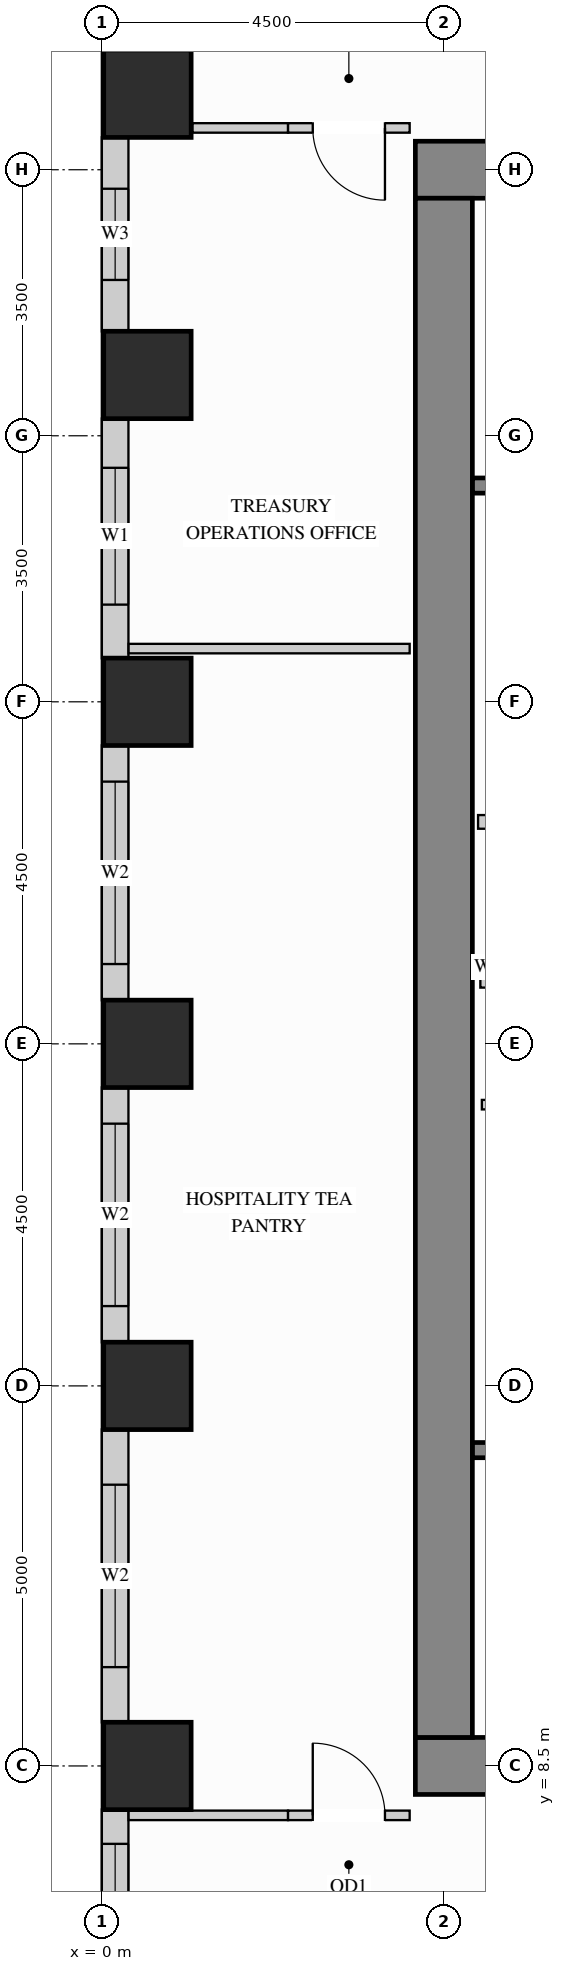
"""IFC4 building model, lengths in metres.
Left out: names, types, materials, properties, quantities, classifications, styles, units other than length and angle.
Written with IfcOpenShell. Run it as: python <this file> out.ifc"""

import sys

from ifc_helpers import new_model, si_unit, direction, frame, frame_2d, origin, origin_2d, place, context, subcontext, project, spatial, rectangle, extrude, source, transform, mapped, element, fill, save


model = new_model("IFC4")
c1 = context("Model", 3, precision=1e-05, world=origin(), true_north=direction((0.0, 1.0)))
c2 = subcontext(c1, "Body", "Model", "MODEL_VIEW")
j1 = project(units=[si_unit("LENGTHUNIT", "METRE"), si_unit("PLANEANGLEUNIT", "RADIAN")], contexts=[c1])
p1 = place(None, origin())
s1 = spatial("IfcSite", under=j1, at=p1, CompositionType="ELEMENT")
p2 = place(p1, origin())
s2 = spatial("IfcBuilding", under=s1, at=p2, CompositionType="ELEMENT")
p3 = place(p2, frame((0.0, 0.0, 99.0)))
s3 = spatial("IfcBuildingStorey", under=s2, at=p3, CompositionType="ELEMENT", Elevation=99.0)
m1 = source(origin(), c2, "Body", "SweptSolid", [
    extrude(rectangle(XDim=1.15, YDim=1.15, at=origin_2d()), origin(), (0.0, 0.0, 1.0), 3.38),
])
for number, where, z_axis, x_axis in (
    (1, (0.6, 13.5, 0.0), (0.0, 0.0, 1.0), (1.0, 0.0, 0.0)),
    (2, (0.6, 18.0, 0.0), (0.0, 0.0, 1.0), (1.0, 0.0, 0.0)),
    (3, (0.6, 22.5, 0.0), (0.0, 0.0, 1.0), (1.0, 0.0, 0.0)),
    (4, (0.6, 26.8, 0.0), (0.0, 0.0, 1.0), (1.0, 0.0, 0.0)),
    (5, (0.6, 30.5, 0.0), (0.0, 0.0, 1.0), (1.0, 0.0, 0.0)),
    (6, (0.6, 8.5, 0.0), (0.0, 0.0, 1.0), (1.0, 0.0, 0.0)),
):
    element("IfcColumn", number, at=place(p3, frame(where, z_axis=z_axis, x_axis=x_axis)), inside=s3, PredefinedType="COLUMN", context=c2, shape_type="MappedRepresentation", body=[
        mapped(m1, transform((0.0, 0.0, 0.0), x_axis=(1.0, 0.0, 0.0), y_axis=(0.0, 1.0, 0.0), z_axis=(0.0, 0.0, 1.0))),
    ])
m2 = source(origin(), c2, "Body", "SweptSolid", [
    extrude(rectangle(XDim=10.75, YDim=0.75, at=frame_2d((5.375, 0.0))), origin(), (0.0, 0.0, 1.0), 3.38),
])
for number, where, z_axis, x_axis in (
    (7, (4.125, 29.5, 0.0), (0.0, 0.0, 1.0), (1.0, 0.0, 0.0)),
    (8, (4.125, 8.5, 0.0), (0.0, 0.0, 1.0), (1.0, 0.0, 0.0)),
):
    element("IfcWall", number, at=place(p3, frame(where, z_axis=z_axis, x_axis=x_axis)), inside=s3, PredefinedType="SHEAR", context=c2, shape_type="MappedRepresentation", body=[
        mapped(m2, transform((0.0, 0.0, 0.0), x_axis=(1.0, 0.0, 0.0), y_axis=(0.0, 1.0, 0.0), z_axis=(0.0, 0.0, 1.0))),
    ])
m3 = source(origin(), c2, "Body", "SweptSolid", [
    extrude(rectangle(XDim=20.25, YDim=0.75, at=frame_2d((10.125, 0.0))), origin(), (0.0, 0.0, 1.0), 3.38),
])
p4 = place(p3, frame((4.5, 8.875, 0.0), z_axis=(0.0, 0.0, 1.0), x_axis=(0.0, 1.0, 0.0)))
e9 = element("IfcWall", 9, at=p4, inside=s3, PredefinedType="SHEAR", context=c2, shape_type="MappedRepresentation", body=[
    mapped(m3, transform((0.0, 0.0, 0.0), x_axis=(1.0, 0.0, 0.0), y_axis=(0.0, 1.0, 0.0), z_axis=(0.0, 0.0, 1.0))),
])
p5 = place(p3, frame((0.175, 29.927, 0.0), z_axis=(0.0, 0.0, 1.0), x_axis=(0.0, -1.0, 0.0)))
e10 = element("IfcWall", 10, at=p5, inside=s3, PredefinedType="SOLIDWALL", context=c2, shape_type="SweptSolid", body=[
    extrude(rectangle(XDim=2.554, YDim=0.35, at=frame_2d((1.277, 0.0))), origin(), (0.0, 0.0, 1.0), 3.365),
])
p6 = place(p5, frame((0.677, 0.0, 0.78)))
e11 = element("IfcOpeningElement", 11, at=p6, cuts=e10, PredefinedType="OPENING", context=c2, shape_type="SweptSolid", body=[
    extrude(rectangle(XDim=1.2, YDim=2.1, at=frame_2d((0.6, 1.05))), frame((0.0, 0.185, 0.0), z_axis=(0.0, -1.0, 0.0), x_axis=(1.0, 0.0, 0.0)), (0.0, 0.0, 1.0), 0.37),
])
p7 = place(p3, frame((0.175, 26.227, 0.0), z_axis=(0.0, 0.0, 1.0), x_axis=(0.0, -1.0, 0.0)))
e12 = element("IfcWall", 12, at=p7, inside=s3, PredefinedType="SOLIDWALL", context=c2, shape_type="SweptSolid", body=[
    extrude(rectangle(XDim=3.154, YDim=0.35, at=frame_2d((1.577, 0.0))), origin(), (0.0, 0.0, 1.0), 3.365),
])
p8 = place(p7, frame((0.648, 0.0, 0.78)))
e13 = element("IfcOpeningElement", 13, at=p8, cuts=e12, PredefinedType="OPENING", context=c2, shape_type="SweptSolid", body=[
    extrude(rectangle(XDim=1.8, YDim=2.1, at=frame_2d((0.9, 1.05))), frame((0.0, 0.185, 0.0), z_axis=(0.0, -1.0, 0.0), x_axis=(1.0, 0.0, 0.0)), (0.0, 0.0, 1.0), 0.37),
])
p9 = place(p3, frame((0.175, 21.927, 0.0), z_axis=(0.0, 0.0, 1.0), x_axis=(0.0, -1.0, 0.0)))
e14 = element("IfcWall", 14, at=p9, inside=s3, PredefinedType="SOLIDWALL", context=c2, shape_type="SweptSolid", body=[
    extrude(rectangle(XDim=3.354, YDim=0.35, at=frame_2d((1.677, 0.0))), origin(), (0.0, 0.0, 1.0), 3.365),
])
p10 = place(p9, frame((0.477, 0.0, 0.78)))
e15 = element("IfcOpeningElement", 15, at=p10, cuts=e14, PredefinedType="OPENING", context=c2, shape_type="SweptSolid", body=[
    extrude(rectangle(XDim=2.4, YDim=2.1, at=frame_2d((1.2, 1.05))), frame((0.0, 0.185, 0.0), z_axis=(0.0, -1.0, 0.0), x_axis=(1.0, 0.0, 0.0)), (0.0, 0.0, 1.0), 0.37),
])
p11 = place(p3, frame((0.175, 17.427, 0.0), z_axis=(0.0, 0.0, 1.0), x_axis=(0.0, -1.0, 0.0)))
e16 = element("IfcWall", 16, at=p11, inside=s3, PredefinedType="SOLIDWALL", context=c2, shape_type="SweptSolid", body=[
    extrude(rectangle(XDim=3.354, YDim=0.35, at=frame_2d((1.677, 0.0))), origin(), (0.0, 0.0, 1.0), 3.365),
])
p12 = place(p11, frame((0.477, 0.0, 0.78)))
e17 = element("IfcOpeningElement", 17, at=p12, cuts=e16, PredefinedType="OPENING", context=c2, shape_type="SweptSolid", body=[
    extrude(rectangle(XDim=2.4, YDim=2.1, at=frame_2d((1.2, 1.05))), frame((0.0, 0.185, 0.0), z_axis=(0.0, -1.0, 0.0), x_axis=(1.0, 0.0, 0.0)), (0.0, 0.0, 1.0), 0.37),
])
p13 = place(p3, frame((0.175, 12.927, 0.0), z_axis=(0.0, 0.0, 1.0), x_axis=(0.0, -1.0, 0.0)))
e18 = element("IfcWall", 18, at=p13, inside=s3, PredefinedType="SOLIDWALL", context=c2, shape_type="SweptSolid", body=[
    extrude(rectangle(XDim=3.854, YDim=0.35, at=frame_2d((1.927, 0.0))), origin(), (0.0, 0.0, 1.0), 3.365),
])
p14 = place(p13, frame((0.727, 0.0, 0.78)))
e19 = element("IfcOpeningElement", 19, at=p14, cuts=e18, PredefinedType="OPENING", context=c2, shape_type="SweptSolid", body=[
    extrude(rectangle(XDim=2.4, YDim=2.1, at=frame_2d((1.2, 1.05))), frame((0.0, 0.185, 0.0), z_axis=(0.0, -1.0, 0.0), x_axis=(1.0, 0.0, 0.0)), (0.0, 0.0, 1.0), 0.37),
])
p15 = place(p3, frame((0.175, 7.927, 0.0), z_axis=(0.0, 0.0, 1.0), x_axis=(0.0, -1.0, 0.0)))
e20 = element("IfcWall", 20, at=p15, inside=s3, PredefinedType="SOLIDWALL", context=c2, shape_type="SweptSolid", body=[
    extrude(rectangle(XDim=3.854, YDim=0.35, at=frame_2d((1.927, 0.0))), origin(), (0.0, 0.0, 1.0), 3.365),
])
p16 = place(p15, frame((0.452, 0.0, 0.78)))
e21 = element("IfcOpeningElement", 21, at=p16, cuts=e20, PredefinedType="OPENING", context=c2, shape_type="SweptSolid", body=[
    extrude(rectangle(XDim=2.4, YDim=2.1, at=frame_2d((1.2, 1.05))), frame((0.0, 0.185, 0.0), z_axis=(0.0, -1.0, 0.0), x_axis=(1.0, 0.0, 0.0)), (0.0, 0.0, 1.0), 0.37),
])
m4 = source(origin(), c2, "Body", "SweptSolid", [
    extrude(rectangle(XDim=2.2, YDim=0.18, at=frame_2d((1.1, 0.0))), origin(), (0.0, 0.0, 1.0), 3.365),
])
p17 = place(p3, frame((4.95, 20.92, 0.0), z_axis=(0.0, 0.0, 1.0), x_axis=(1.0, 0.0, 0.0)))
e22 = element("IfcWall", 22, at=p17, inside=s3, PredefinedType="PARTITIONING", context=c2, shape_type="MappedRepresentation", body=[
    mapped(m4, transform((0.0, 0.0, 0.0), x_axis=(1.0, 0.0, 0.0), y_axis=(0.0, 1.0, 0.0), z_axis=(0.0, 0.0, 1.0))),
])
p18 = place(p3, frame((5.0, 17.2, 0.0), z_axis=(0.0, 0.0, 1.0), x_axis=(1.0, 0.0, 0.0)))
e23 = element("IfcWall", 23, at=p18, inside=s3, PredefinedType="PARTITIONING", context=c2, shape_type="SweptSolid", body=[
    extrude(rectangle(XDim=2.4, YDim=0.125, at=frame_2d((1.2, 0.0))), origin(), (0.0, 0.0, 1.0), 3.365),
])
p19 = place(p18, frame((0.7, 0.0, 0.0)))
e24 = element("IfcOpeningElement", 24, at=p19, cuts=e23, PredefinedType="OPENING", context=c2, shape_type="SweptSolid", body=[
    extrude(rectangle(XDim=0.85, YDim=2.1, at=frame_2d((0.425, 1.05))), frame((0.0, 0.073, 0.0), z_axis=(0.0, -1.0, 0.0), x_axis=(1.0, 0.0, 0.0)), (0.0, 0.0, 1.0), 0.145),
])
m5 = source(origin(), c2, "Body", "SweptSolid", [
    extrude(rectangle(XDim=1.26, YDim=0.125, at=frame_2d((0.63, 0.0))), origin(), (0.0, 0.0, 1.0), 3.365),
])
p20 = place(p3, frame((1.19, 30.05, 0.0), z_axis=(0.0, 0.0, 1.0), x_axis=(1.0, 0.0, 0.0)))
e25 = element("IfcWall", 25, at=p20, inside=s3, PredefinedType="PARTITIONING", context=c2, shape_type="MappedRepresentation", body=[
    mapped(m5, transform((0.0, 0.0, 0.0), x_axis=(1.0, 0.0, 0.0), y_axis=(0.0, 1.0, 0.0), z_axis=(0.0, 0.0, 1.0))),
])
p21 = place(p3, frame((2.45, 30.05, 0.0), z_axis=(0.0, 0.0, 1.0), x_axis=(1.0, 0.0, 0.0)))
e26 = element("IfcWall", 26, at=p21, inside=s3, PredefinedType="PARTITIONING", context=c2, shape_type="SweptSolid", body=[
    extrude(rectangle(XDim=1.6, YDim=0.125, at=frame_2d((0.8, 0.0))), origin(), (0.0, 0.0, 1.0), 3.365),
])
p22 = place(p21, frame((0.325, 0.0, 0.0)))
e27 = element("IfcOpeningElement", 27, at=p22, cuts=e26, PredefinedType="OPENING", context=c2, shape_type="SweptSolid", body=[
    extrude(rectangle(XDim=0.95, YDim=2.15, at=frame_2d((0.475, 1.075))), frame((0.0, 0.073, 0.0), z_axis=(0.0, -1.0, 0.0), x_axis=(1.0, 0.0, 0.0)), (0.0, 0.0, 1.0), 0.145),
])
m6 = source(origin(), c2, "Body", "SweptSolid", [
    extrude(rectangle(XDim=2.098, YDim=0.125, at=frame_2d((1.049, 0.0))), origin(), (0.0, 0.0, 1.0), 3.365),
])
p23 = place(p3, frame((0.352, 7.85, 0.0), z_axis=(0.0, 0.0, 1.0), x_axis=(1.0, 0.0, 0.0)))
e28 = element("IfcWall", 28, at=p23, inside=s3, PredefinedType="PARTITIONING", context=c2, shape_type="MappedRepresentation", body=[
    mapped(m6, transform((0.0, 0.0, 0.0), x_axis=(1.0, 0.0, 0.0), y_axis=(0.0, 1.0, 0.0), z_axis=(0.0, 0.0, 1.0))),
])
p24 = place(p3, frame((2.45, 7.85, 0.0), z_axis=(0.0, 0.0, 1.0), x_axis=(1.0, 0.0, 0.0)))
e29 = element("IfcWall", 29, at=p24, inside=s3, PredefinedType="PARTITIONING", context=c2, shape_type="SweptSolid", body=[
    extrude(rectangle(XDim=1.6, YDim=0.125, at=frame_2d((0.8, 0.0))), origin(), (0.0, 0.0, 1.0), 3.365),
])
p25 = place(p24, frame((0.325, 0.0, 0.0)))
e30 = element("IfcOpeningElement", 30, at=p25, cuts=e29, PredefinedType="OPENING", context=c2, shape_type="SweptSolid", body=[
    extrude(rectangle(XDim=0.95, YDim=2.15, at=frame_2d((0.475, 1.075))), frame((0.0, 0.073, 0.0), z_axis=(0.0, -1.0, 0.0), x_axis=(1.0, 0.0, 0.0)), (0.0, 0.0, 1.0), 0.145),
])
m7 = source(origin(), c2, "Body", "SweptSolid", [
    extrude(rectangle(XDim=3.698, YDim=0.125, at=frame_2d((1.849, 0.0))), origin(), (0.0, 0.0, 1.0), 3.365),
])
p26 = place(p3, frame((0.352, 23.2, 0.0), z_axis=(0.0, 0.0, 1.0), x_axis=(1.0, 0.0, 0.0)))
e31 = element("IfcWall", 31, at=p26, inside=s3, PredefinedType="PARTITIONING", context=c2, shape_type="MappedRepresentation", body=[
    mapped(m7, transform((0.0, 0.0, 0.0), x_axis=(1.0, 0.0, 0.0), y_axis=(0.0, 1.0, 0.0), z_axis=(0.0, 0.0, 1.0))),
])
m8 = source(origin(), c2, "Body", "SweptSolid", [
    extrude(rectangle(XDim=2.09, YDim=0.2, at=frame_2d((1.045, 0.0))), origin(), (0.0, 0.0, 1.0), 3.365),
])
p27 = place(p3, frame((4.98, 18.84, 0.0), z_axis=(0.0, 0.0, 1.0), x_axis=(1.0, 0.0, 0.0)))
e32 = element("IfcWall", 32, at=p27, inside=s3, PredefinedType="PARTITIONING", context=c2, shape_type="MappedRepresentation", body=[
    mapped(m8, transform((0.0, 0.0, 0.0), x_axis=(1.0, 0.0, 0.0), y_axis=(0.0, 1.0, 0.0), z_axis=(0.0, 0.0, 1.0))),
])
p28 = place(p3, frame((4.877, 12.655, 0.0), z_axis=(0.0, 0.0, 1.0), x_axis=(1.0, 0.0, 0.0)))
e33 = element("IfcWall", 33, at=p28, inside=s3, PredefinedType="SHEAR", context=c2, shape_type="SweptSolid", body=[
    extrude(rectangle(XDim=7.528, YDim=0.2, at=frame_2d((3.764, 0.0))), origin(), (0.0, 0.0, 1.0), 3.38),
])
p29 = place(p28, frame((0.4, 0.0, 0.0)))
e34 = element("IfcOpeningElement", 34, at=p29, cuts=e33, PredefinedType="OPENING", context=c2, shape_type="SweptSolid", body=[
    extrude(rectangle(XDim=1.1, YDim=2.15, at=frame_2d((0.55, 1.075))), frame((0.0, 0.11, 0.0), z_axis=(0.0, -1.0, 0.0), x_axis=(1.0, 0.0, 0.0)), (0.0, 0.0, 1.0), 0.22),
])
p30 = place(p3, frame((4.877, 25.345, 0.0), z_axis=(0.0, 0.0, 1.0), x_axis=(1.0, 0.0, 0.0)))
e35 = element("IfcWall", 35, at=p30, inside=s3, PredefinedType="SHEAR", context=c2, shape_type="SweptSolid", body=[
    extrude(rectangle(XDim=7.528, YDim=0.2, at=frame_2d((3.764, 0.0))), origin(), (0.0, 0.0, 1.0), 3.38),
])
p31 = place(p30, frame((0.4, 0.0, 0.0)))
e36 = element("IfcOpeningElement", 36, at=p31, cuts=e35, PredefinedType="OPENING", context=c2, shape_type="SweptSolid", body=[
    extrude(rectangle(XDim=1.1, YDim=2.15, at=frame_2d((0.55, 1.075))), frame((0.0, 0.11, 0.0), z_axis=(0.0, -1.0, 0.0), x_axis=(1.0, 0.0, 0.0)), (0.0, 0.0, 1.0), 0.22),
])
m9 = source(origin(), c2, "Body", "SweptSolid", [
    extrude(rectangle(XDim=0.95, YDim=2.15, at=frame_2d((0.475, 1.075))), frame((0.0, 0.025, 0.0), z_axis=(0.0, -1.0, 0.0), x_axis=(1.0, 0.0, 0.0)), (0.0, 0.0, 1.0), 0.05),
])
p32 = place(p25, origin())
e37 = element("IfcDoor", 37, at=p32, inside=s3, OperationType="SINGLE_SWING_LEFT", PredefinedType="DOOR", context=c2, shape_type="MappedRepresentation", body=[
    mapped(m9, transform((0.0, 0.0, 0.0), x_axis=(1.0, 0.0, 0.0), y_axis=(0.0, 1.0, 0.0), z_axis=(0.0, 0.0, 1.0))),
])
fill(e30, e37)
p33 = place(p22, origin())
e38 = element("IfcDoor", 38, at=p33, inside=s3, OperationType="SINGLE_SWING_RIGHT", PredefinedType="DOOR", context=c2, shape_type="MappedRepresentation", body=[
    mapped(m9, transform((0.0, 0.0, 0.0), x_axis=(1.0, 0.0, 0.0), y_axis=(0.0, 1.0, 0.0), z_axis=(0.0, 0.0, 1.0))),
])
fill(e27, e38)
m10 = source(origin(), c2, "Body", "SweptSolid", [
    extrude(rectangle(XDim=1.8, YDim=2.1, at=frame_2d((0.9, 1.05))), frame((0.0, 0.03, 0.0), z_axis=(0.0, -1.0, 0.0), x_axis=(1.0, 0.0, 0.0)), (0.0, 0.0, 1.0), 0.06),
])
p34 = place(p8, origin())
e39 = element("IfcWindow", 39, at=p34, inside=s3, PartitioningType="SINGLE_PANEL", PredefinedType="WINDOW", context=c2, shape_type="MappedRepresentation", body=[
    mapped(m10, transform((0.0, 0.0, 0.0), x_axis=(1.0, 0.0, 0.0), y_axis=(0.0, 1.0, 0.0), z_axis=(0.0, 0.0, 1.0))),
])
fill(e13, e39)
m11 = source(origin(), c2, "Body", "SweptSolid", [
    extrude(rectangle(XDim=2.4, YDim=2.1, at=frame_2d((1.2, 1.05))), frame((0.0, 0.03, 0.0), z_axis=(0.0, -1.0, 0.0), x_axis=(1.0, 0.0, 0.0)), (0.0, 0.0, 1.0), 0.06),
])
p35 = place(p10, origin())
e40 = element("IfcWindow", 40, at=p35, inside=s3, PartitioningType="SINGLE_PANEL", PredefinedType="WINDOW", context=c2, shape_type="MappedRepresentation", body=[
    mapped(m11, transform((0.0, 0.0, 0.0), x_axis=(1.0, 0.0, 0.0), y_axis=(0.0, 1.0, 0.0), z_axis=(0.0, 0.0, 1.0))),
])
fill(e15, e40)
p36 = place(p12, origin())
e41 = element("IfcWindow", 41, at=p36, inside=s3, PartitioningType="SINGLE_PANEL", PredefinedType="WINDOW", context=c2, shape_type="MappedRepresentation", body=[
    mapped(m11, transform((0.0, 0.0, 0.0), x_axis=(1.0, 0.0, 0.0), y_axis=(0.0, 1.0, 0.0), z_axis=(0.0, 0.0, 1.0))),
])
fill(e17, e41)
p37 = place(p14, origin())
e42 = element("IfcWindow", 42, at=p37, inside=s3, PartitioningType="SINGLE_PANEL", PredefinedType="WINDOW", context=c2, shape_type="MappedRepresentation", body=[
    mapped(m11, transform((0.0, 0.0, 0.0), x_axis=(1.0, 0.0, 0.0), y_axis=(0.0, 1.0, 0.0), z_axis=(0.0, 0.0, 1.0))),
])
fill(e19, e42)
p38 = place(p16, origin())
e43 = element("IfcWindow", 43, at=p38, inside=s3, PartitioningType="SINGLE_PANEL", PredefinedType="WINDOW", context=c2, shape_type="MappedRepresentation", body=[
    mapped(m11, transform((0.0, 0.0, 0.0), x_axis=(1.0, 0.0, 0.0), y_axis=(0.0, 1.0, 0.0), z_axis=(0.0, 0.0, 1.0))),
])
fill(e21, e43)
m12 = source(origin(), c2, "Body", "SweptSolid", [
    extrude(rectangle(XDim=1.2, YDim=2.1, at=frame_2d((0.6, 1.05))), frame((0.0, 0.03, 0.0), z_axis=(0.0, -1.0, 0.0), x_axis=(1.0, 0.0, 0.0)), (0.0, 0.0, 1.0), 0.06),
])
p39 = place(p6, origin())
e44 = element("IfcWindow", 44, at=p39, inside=s3, PartitioningType="SINGLE_PANEL", PredefinedType="WINDOW", context=c2, shape_type="MappedRepresentation", body=[
    mapped(m12, transform((0.0, 0.0, 0.0), x_axis=(1.0, 0.0, 0.0), y_axis=(0.0, 1.0, 0.0), z_axis=(0.0, 0.0, 1.0))),
])
fill(e11, e44)
save(model, sys.argv[1])
